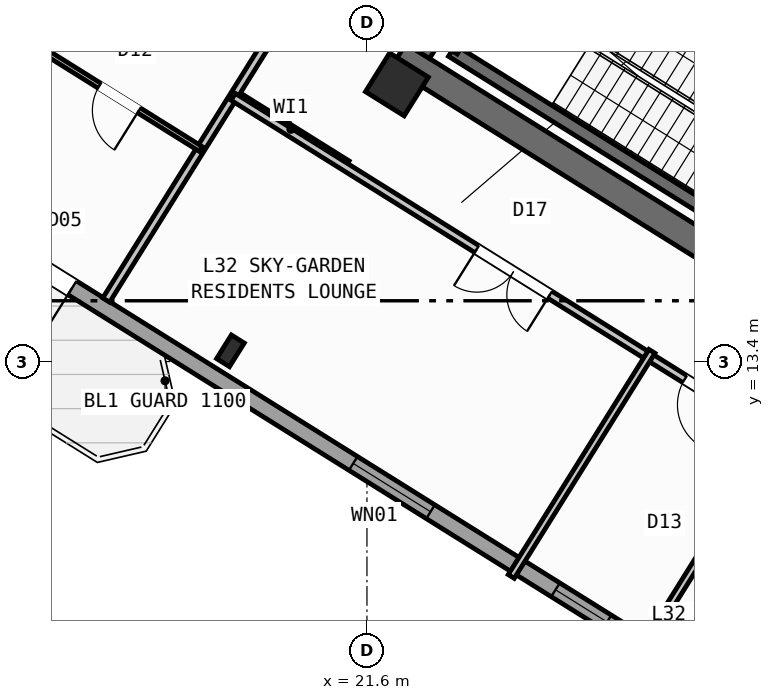
"""IFC4 building model, lengths in metres.
Left out: names, types, materials, properties, quantities, classifications, styles, units other than length and angle.
Written with IfcOpenShell. Run it as: python <this file> out.ifc"""

import sys

from ifc_helpers import new_model, si_unit, direction, frame, frame_2d, origin, origin_2d, place, context, subcontext, project, spatial, rectangle, hollow_rectangle, i_section, extrude, source, transform, mapped, element, fill, save


model = new_model("IFC4")
c1 = context("Model", 3, precision=1e-05, world=origin(), true_north=direction((0.0, 1.0)))
c2 = subcontext(c1, "Body", "Model", "MODEL_VIEW")
j1 = project(units=[si_unit("LENGTHUNIT", "METRE"), si_unit("PLANEANGLEUNIT", "RADIAN")], contexts=[c1])
p1 = place(None, origin())
s1 = spatial("IfcSite", under=j1, at=p1, CompositionType="ELEMENT")
p2 = place(p1, origin())
s2 = spatial("IfcBuilding", under=s1, at=p2, CompositionType="ELEMENT")
p3 = place(p2, frame((0.0, 0.0, 127.8)))
s3 = spatial("IfcBuildingStorey", under=s2, at=p3, CompositionType="ELEMENT", Elevation=127.8)
p4 = place(p3, frame((33.366, 12.477, 0.0), z_axis=(0.0, 0.0, 1.0), x_axis=(-0.848047359947, 0.529920442413, 0.0)))
e1 = element("IfcWall", 1, at=p4, inside=s3, PredefinedType="SHEAR", context=c2, shape_type="SweptSolid", body=[
    extrude(rectangle(XDim=13.14, YDim=0.55, at=frame_2d((6.57, 0.0))), origin(), (0.0, 0.0, 1.0), 4.55),
])
p5 = place(p3, frame((26.007, 24.976, 0.0), z_axis=(0.0, 0.0, 1.0), x_axis=(-0.529923795287, -0.848045264823, 0.0)))
e2 = element("IfcWall", 2, at=p5, inside=s3, PredefinedType="SHEAR", context=c2, shape_type="SweptSolid", body=[
    extrude(rectangle(XDim=6.425, YDim=0.55, at=frame_2d((3.212, 0.0))), origin(), (0.0, 0.0, 1.0), 4.55),
])
m1 = source(origin(), c2, "Body", "SweptSolid", [
    extrude(hollow_rectangle(XDim=0.9, YDim=0.9, WallThickness=0.036, at=origin_2d()), origin(), (0.0, 0.0, 1.0), 4.8),
])
p6 = place(p3, frame((22.191, 18.87, 0.0), z_axis=(0.0, 0.0, 1.0), x_axis=(-0.848048096156, 0.529919264233, 0.0)))
e3 = element("IfcColumn", 3, at=p6, inside=s3, PredefinedType="COLUMN", context=c2, shape_type="MappedRepresentation", body=[
    mapped(m1, transform((0.0, 0.0, 0.0), scale=1.0)),
])
m2 = source(origin(), c2, "Body", "SweptSolid", [
    extrude(i_section(OverallWidth=0.3, OverallDepth=0.55, WebThickness=0.015, FlangeThickness=0.029, at=origin_2d()), origin(), (0.0, 0.0, 1.0), 4.8),
])
p7 = place(p3, frame((18.906, 13.612, 0.0), z_axis=(0.0, 0.0, 1.0), x_axis=(-0.848048096156, 0.529919264233, 0.0)))
e4 = element("IfcColumn", 4, at=p7, inside=s3, PredefinedType="COLUMN", context=c2, shape_type="MappedRepresentation", body=[
    mapped(m2, transform((0.0, 0.0, 0.0), scale=1.0)),
])
p8 = place(p3, frame((29.268, 6.429, 0.0), z_axis=(0.0, 0.0, 1.0), x_axis=(-0.848049971435, 0.529916263149, 0.0)))
e5 = element("IfcWall", 5, at=p8, inside=s3, PredefinedType="STANDARD", context=c2, shape_type="SweptSolid", body=[
    extrude(rectangle(XDim=31.588, YDim=0.32, at=frame_2d((15.794, 0.0))), origin(), (0.0, 0.0, 1.0), 4.55),
])
p9 = place(p8, frame((15.901, 0.0, 0.0)))
e6 = element("IfcOpeningElement", 6, at=p9, cuts=e5, PredefinedType="OPENING", context=c2, shape_type="SweptSolid", body=[
    extrude(rectangle(XDim=1.2, YDim=2.15, at=frame_2d((0.6, 1.075))), frame((0.0, 0.17, 0.0), z_axis=(0.0, -1.0, 0.0), x_axis=(1.0, 0.0, 0.0)), (0.0, 0.0, 1.0), 0.34),
])
p10 = place(p8, frame((3.454, 0.0, 0.95)))
e7 = element("IfcOpeningElement", 7, at=p10, cuts=e5, PredefinedType="OPENING", context=c2, shape_type="SweptSolid", body=[
    extrude(rectangle(XDim=1.2, YDim=1.4, at=frame_2d((0.6, 0.7))), frame((0.0, 0.17, 0.0), z_axis=(0.0, -1.0, 0.0), x_axis=(1.0, 0.0, 0.0)), (0.0, 0.0, 1.0), 0.34),
])
p11 = place(p8, frame((7.561, 0.0, 0.85)))
e8 = element("IfcOpeningElement", 8, at=p11, cuts=e5, PredefinedType="OPENING", context=c2, shape_type="SweptSolid", body=[
    extrude(rectangle(XDim=1.8, YDim=1.5, at=frame_2d((0.9, 0.75))), frame((0.0, 0.17, 0.0), z_axis=(0.0, -1.0, 0.0), x_axis=(1.0, 0.0, 0.0)), (0.0, 0.0, 1.0), 0.34),
])
p12 = place(p8, frame((21.594, 0.0, 0.95)))
e9 = element("IfcOpeningElement", 9, at=p12, cuts=e5, PredefinedType="OPENING", context=c2, shape_type="SweptSolid", body=[
    extrude(rectangle(XDim=1.2, YDim=1.4, at=frame_2d((0.6, 0.7))), frame((0.0, 0.17, 0.0), z_axis=(0.0, -1.0, 0.0), x_axis=(1.0, 0.0, 0.0)), (0.0, 0.0, 1.0), 0.34),
])
p13 = place(p8, frame((29.878, 0.0, 1.0)))
e10 = element("IfcOpeningElement", 10, at=p13, cuts=e5, PredefinedType="OPENING", context=c2, shape_type="SweptSolid", body=[
    extrude(rectangle(XDim=0.9, YDim=1.25, at=frame_2d((0.45, 0.625))), frame((0.0, 0.17, 0.0), z_axis=(0.0, -1.0, 0.0), x_axis=(1.0, 0.0, 0.0)), (0.0, 0.0, 1.0), 0.34),
])
p14 = place(p8, frame((27.364, 0.0, 1.0)))
e11 = element("IfcOpeningElement", 11, at=p14, cuts=e5, PredefinedType="OPENING", context=c2, shape_type="SweptSolid", body=[
    extrude(rectangle(XDim=0.9, YDim=1.25, at=frame_2d((0.45, 0.625))), frame((0.0, 0.17, 0.0), z_axis=(0.0, -1.0, 0.0), x_axis=(1.0, 0.0, 0.0)), (0.0, 0.0, 1.0), 0.34),
])
p15 = place(p3, frame((29.605, 15.581, 0.0), z_axis=(0.0, 0.0, 1.0), x_axis=(-0.848036911448, 0.529937163087, 0.0)))
e12 = element("IfcWall", 12, at=p15, inside=s3, PredefinedType="SHEAR", context=c2, shape_type="SweptSolid", body=[
    extrude(rectangle(XDim=7.46, YDim=0.26, at=frame_2d((3.73, 0.0))), origin(), (0.0, 0.0, 1.0), 4.55),
])
p16 = place(p3, frame((31.28, 18.261, 0.0), z_axis=(0.0, 0.0, 1.0), x_axis=(-0.848051618787, 0.529913626805, 0.0)))
e13 = element("IfcWall", 13, at=p16, inside=s3, PredefinedType="SHEAR", context=c2, shape_type="SweptSolid", body=[
    extrude(rectangle(XDim=7.46, YDim=0.26, at=frame_2d((3.73, 0.0))), origin(), (0.0, 0.0, 1.0), 4.55),
])
p17 = place(p16, frame((0.36, 0.0, 0.0)))
e14 = element("IfcOpeningElement", 14, at=p17, cuts=e13, PredefinedType="OPENING", context=c2, shape_type="SweptSolid", body=[
    extrude(rectangle(XDim=0.86, YDim=2.05, at=frame_2d((0.43, 1.025))), frame((0.0, 0.14, 0.0), z_axis=(0.0, -1.0, 0.0), x_axis=(1.0, 0.0, 0.0)), (0.0, 0.0, 1.0), 0.28),
])
p18 = place(p3, frame((24.945, 22.22, 0.0), z_axis=(0.0, 0.0, 1.0), x_axis=(-0.529908658664, -0.84805472316, 0.0)))
e15 = element("IfcWall", 15, at=p18, inside=s3, PredefinedType="SHEAR", context=c2, shape_type="SweptSolid", body=[
    extrude(rectangle(XDim=3.16, YDim=0.26, at=frame_2d((1.58, 0.0))), origin(), (0.0, 0.0, 1.0), 4.55),
])
p19 = place(p3, frame((21.206, 17.292, 0.0), z_axis=(0.0, 0.0, 1.0), x_axis=(-0.848050851465, 0.529914854792, 0.0)))
e16 = element("IfcWall", 16, at=p19, inside=s3, PredefinedType="PARTITIONING", context=c2, shape_type="SweptSolid", body=[
    extrude(rectangle(XDim=2.61, YDim=0.16, at=frame_2d((1.305, 0.0))), origin(), (0.0, 0.0, 1.0), 4.54),
])
p20 = place(p3, frame((21.329, 22.416, 0.0), z_axis=(0.0, 0.0, 1.0), x_axis=(-0.529920220799, -0.848047498427, 0.0)))
e17 = element("IfcWall", 17, at=p20, inside=s3, PredefinedType="PARTITIONING", context=c2, shape_type="SweptSolid", body=[
    extrude(rectangle(XDim=9.2, YDim=0.16, at=frame_2d((4.6, 0.0))), origin(), (0.0, 0.0, 1.0), 4.54),
])
p21 = place(p3, frame((16.519, 21.87, 0.0), z_axis=(0.0, 0.0, 1.0), x_axis=(-0.529922447305, -0.848046107144, 0.0)))
e18 = element("IfcWall", 18, at=p21, inside=s3, PredefinedType="PARTITIONING", context=c2, shape_type="SweptSolid", body=[
    extrude(rectangle(XDim=5.451, YDim=0.16, at=frame_2d((2.726, 0.0))), origin(), (0.0, 0.0, 1.0), 3.975),
])
p22 = place(p3, frame((18.318, 17.597, 0.0), z_axis=(0.0, 0.0, 1.0), x_axis=(-0.848059820872, 0.529900500304, 0.0)))
e19 = element("IfcWall", 19, at=p22, inside=s3, PredefinedType="PARTITIONING", context=c2, shape_type="SweptSolid", body=[
    extrude(rectangle(XDim=3.79, YDim=0.11, at=frame_2d((1.895, 0.0))), origin(), (0.0, 0.0, 1.0), 4.54),
])
p23 = place(p22, frame((1.435, 0.0, 0.0)))
e20 = element("IfcOpeningElement", 20, at=p23, cuts=e19, PredefinedType="OPENING", context=c2, shape_type="SweptSolid", body=[
    extrude(rectangle(XDim=0.92, YDim=2.08, at=frame_2d((0.46, 1.04))), frame((0.0, 0.065, 0.0), z_axis=(0.0, -1.0, 0.0), x_axis=(1.0, 0.0, 0.0)), (0.0, 0.0, 1.0), 0.13),
])
p24 = place(p3, frame((32.164, 10.374, 0.0), z_axis=(0.0, 0.0, 1.0), x_axis=(-0.848044107957, 0.529925646633, 0.0)))
e21 = element("IfcWall", 21, at=p24, inside=s3, PredefinedType="PARTITIONING", context=c2, shape_type="SweptSolid", body=[
    extrude(rectangle(XDim=15.57, YDim=0.16, at=frame_2d((7.785, 0.0))), origin(), (0.0, 0.0, 1.0), 4.54),
])
p25 = place(p24, frame((4.1, 0.0, 0.0)))
e22 = element("IfcOpeningElement", 22, at=p25, cuts=e21, PredefinedType="OPENING", context=c2, shape_type="SweptSolid", body=[
    extrude(rectangle(XDim=0.96, YDim=2.08, at=frame_2d((0.48, 1.04))), frame((0.0, 0.09, 0.0), z_axis=(0.0, -1.0, 0.0), x_axis=(1.0, 0.0, 0.0)), (0.0, 0.0, 1.0), 0.18),
])
p26 = place(p24, frame((8.2, 0.0, 0.0)))
e23 = element("IfcOpeningElement", 23, at=p26, cuts=e21, PredefinedType="OPENING", context=c2, shape_type="SweptSolid", body=[
    extrude(rectangle(XDim=1.7, YDim=2.2, at=frame_2d((0.85, 1.1))), frame((0.0, 0.09, 0.0), z_axis=(0.0, -1.0, 0.0), x_axis=(1.0, 0.0, 0.0)), (0.0, 0.0, 1.0), 0.18),
])
p27 = place(p3, frame((29.735, 12.034, 0.0), z_axis=(0.0, 0.0, 1.0), x_axis=(-0.529890046623, -0.848066352646, 0.0)))
e24 = element("IfcWall", 24, at=p27, inside=s3, PredefinedType="PLUMBINGWALL", context=c2, shape_type="SweptSolid", body=[
    extrude(rectangle(XDim=5.24, YDim=0.14, at=frame_2d((2.62, 0.0))), origin(), (0.0, 0.0, 1.0), 4.54),
])
p28 = place(p27, frame((2.07, 0.0, 0.0)))
e25 = element("IfcOpeningElement", 25, at=p28, cuts=e24, PredefinedType="OPENING", context=c2, shape_type="SweptSolid", body=[
    extrude(rectangle(XDim=0.88, YDim=2.08, at=frame_2d((0.44, 1.04))), frame((0.0, 0.08, 0.0), z_axis=(0.0, -1.0, 0.0), x_axis=(1.0, 0.0, 0.0)), (0.0, 0.0, 1.0), 0.16),
])
p29 = place(p3, frame((27.225, 13.602, 0.0), z_axis=(0.0, 0.0, 1.0), x_axis=(-0.529944493599, -0.848032330577, 0.0)))
e26 = element("IfcWall", 26, at=p29, inside=s3, PredefinedType="PLUMBINGWALL", context=c2, shape_type="SweptSolid", body=[
    extrude(rectangle(XDim=5.24, YDim=0.14, at=frame_2d((2.62, 0.0))), origin(), (0.0, 0.0, 1.0), 4.54),
])
m3 = source(origin(), c2, "Body", "SweptSolid", [
    extrude(rectangle(XDim=1.2, YDim=2.15, at=frame_2d((0.6, 1.075))), frame((0.0, 0.025, 0.0), z_axis=(0.0, -1.0, 0.0), x_axis=(1.0, 0.0, 0.0)), (0.0, 0.0, 1.0), 0.05),
])
p30 = place(p9, origin())
e27 = element("IfcDoor", 27, at=p30, inside=s3, OperationType="SINGLE_SWING_LEFT", PredefinedType="DOOR", context=c2, shape_type="MappedRepresentation", body=[
    mapped(m3, transform((0.0, 0.0, 0.0), scale=1.0)),
])
fill(e6, e27)
m4 = source(origin(), c2, "Body", "SweptSolid", [
    extrude(rectangle(XDim=1.2, YDim=1.4, at=frame_2d((0.6, 0.7))), frame((0.0, 0.03, 0.0), z_axis=(0.0, -1.0, 0.0), x_axis=(1.0, 0.0, 0.0)), (0.0, 0.0, 1.0), 0.06),
])
p31 = place(p10, origin())
e28 = element("IfcWindow", 28, at=p31, inside=s3, PartitioningType="SINGLE_PANEL", PredefinedType="WINDOW", context=c2, shape_type="MappedRepresentation", body=[
    mapped(m4, transform((0.0, 0.0, 0.0), scale=1.0)),
])
fill(e7, e28)
m5 = source(origin(), c2, "Body", "SweptSolid", [
    extrude(rectangle(XDim=1.8, YDim=1.5, at=frame_2d((0.9, 0.75))), frame((0.0, 0.03, 0.0), z_axis=(0.0, -1.0, 0.0), x_axis=(1.0, 0.0, 0.0)), (0.0, 0.0, 1.0), 0.06),
])
p32 = place(p11, origin())
e29 = element("IfcWindow", 29, at=p32, inside=s3, PartitioningType="SINGLE_PANEL", PredefinedType="WINDOW", context=c2, shape_type="MappedRepresentation", body=[
    mapped(m5, transform((0.0, 0.0, 0.0), scale=1.0)),
])
fill(e8, e29)
m6 = source(origin(), c2, "Body", "SweptSolid", [
    extrude(rectangle(XDim=0.92, YDim=2.08, at=frame_2d((0.46, 1.04))), frame((0.0, 0.025, 0.0), z_axis=(0.0, -1.0, 0.0), x_axis=(1.0, 0.0, 0.0)), (0.0, 0.0, 1.0), 0.05),
])
p33 = place(p23, origin())
e30 = element("IfcDoor", 30, at=p33, inside=s3, OperationType="SINGLE_SWING_LEFT", PredefinedType="DOOR", context=c2, shape_type="MappedRepresentation", body=[
    mapped(m6, transform((0.0, 0.0, 0.0), scale=1.0)),
])
fill(e20, e30)
m7 = source(origin(), c2, "Body", "SweptSolid", [
    extrude(rectangle(XDim=0.96, YDim=2.08, at=frame_2d((0.48, 1.04))), frame((0.0, 0.025, 0.0), z_axis=(0.0, -1.0, 0.0), x_axis=(1.0, 0.0, 0.0)), (0.0, 0.0, 1.0), 0.05),
])
p34 = place(p25, origin())
e31 = element("IfcDoor", 31, at=p34, inside=s3, OperationType="SINGLE_SWING_LEFT", PredefinedType="DOOR", context=c2, shape_type="MappedRepresentation", body=[
    mapped(m7, transform((0.0, 0.0, 0.0), scale=1.0)),
])
fill(e22, e31)
m8 = source(origin(), c2, "Body", "SweptSolid", [
    extrude(rectangle(XDim=1.7, YDim=2.2, at=frame_2d((0.85, 1.1))), frame((0.0, 0.025, 0.0), z_axis=(0.0, -1.0, 0.0), x_axis=(1.0, 0.0, 0.0)), (0.0, 0.0, 1.0), 0.05),
])
p35 = place(p26, origin())
e32 = element("IfcDoor", 32, at=p35, inside=s3, OperationType="DOUBLE_DOOR_SINGLE_SWING", PredefinedType="DOOR", context=c2, shape_type="MappedRepresentation", body=[
    mapped(m8, transform((0.0, 0.0, 0.0), scale=1.0)),
])
fill(e23, e32)
save(model, sys.argv[1])
